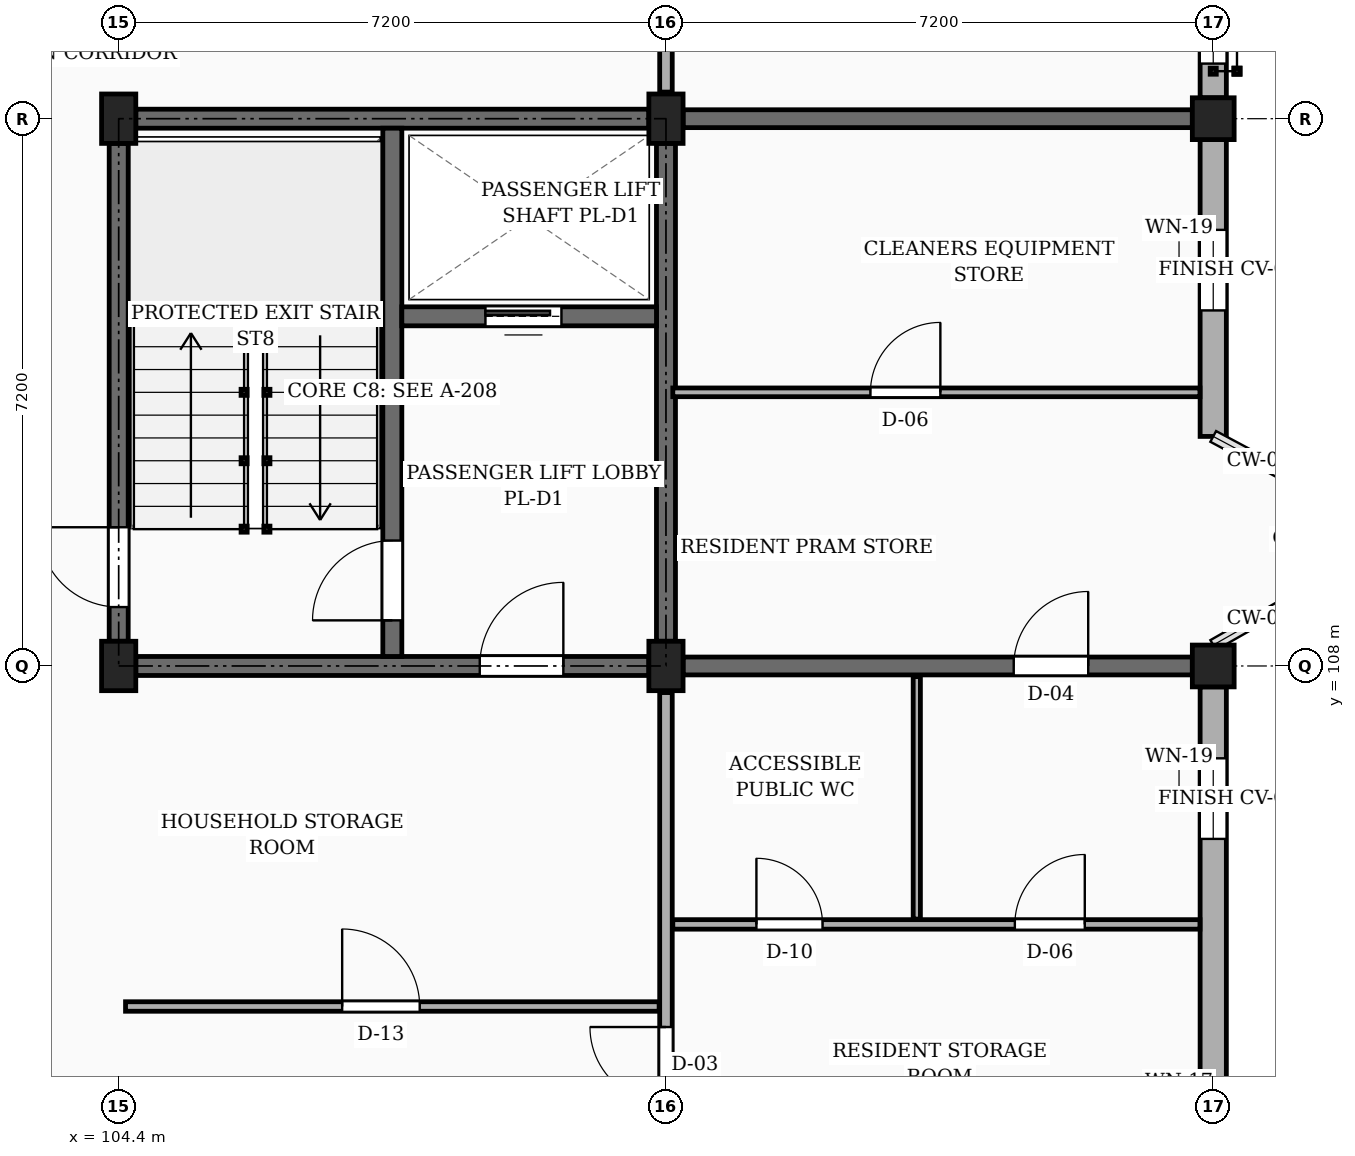
"""IFC4 building model, lengths in metres.
Left out: names, types, materials, properties, quantities, classifications, styles, units other than length and angle.
Written with IfcOpenShell. Run it as: python <this file> out.ifc"""

import sys

from ifc_helpers import new_model, si_unit, direction, frame, frame_2d, origin, origin_2d, place, context, subcontext, project, spatial, rectangle, extrude, element, fill, save


model = new_model("IFC4")
c1 = context("Model", 3, precision=1e-05, world=origin(), true_north=direction((0.0, 1.0)))
c2 = subcontext(c1, "Body", "Model", "MODEL_VIEW")
j1 = project(units=[si_unit("LENGTHUNIT", "METRE"), si_unit("PLANEANGLEUNIT", "RADIAN")], contexts=[c1])
p1 = place(None, origin())
s1 = spatial("IfcSite", under=j1, at=p1, CompositionType="ELEMENT")
p2 = place(p1, origin())
s2 = spatial("IfcBuilding", under=s1, at=p2, CompositionType="ELEMENT")
p3 = place(p2, frame((0.0, 0.0, 20.25)))
s3 = spatial("IfcBuildingStorey", under=s2, at=p3, CompositionType="ELEMENT", Elevation=20.25)
for number, where, z_axis, x_axis in (
    (1, (104.4, 108.0, 0.0), (0.0, 0.0, 1.0), (1.0, 0.0, 0.0)),
    (2, (104.4, 115.2, 0.0), (0.0, 0.0, 1.0), (1.0, 0.0, 0.0)),
    (3, (111.6, 108.0, 0.0), (0.0, 0.0, 1.0), (1.0, 0.0, 0.0)),
    (4, (111.6, 115.2, 0.0), (0.0, 0.0, 1.0), (1.0, 0.0, 0.0)),
):
    element("IfcColumn", number, at=place(p3, frame(where, z_axis=z_axis, x_axis=x_axis)), inside=s3, PredefinedType="COLUMN", context=c2, shape_type="SweptSolid", body=[
        extrude(rectangle(XDim=0.45, YDim=0.65, at=origin_2d()), origin(), (0.0, 0.0, 1.0), 3.15),
    ])
for number, where, z_axis, x_axis in (
    (5, (118.8, 108.0, 0.0), (0.0, 0.0, 1.0), (1.0, 0.0, 0.0)),
    (6, (118.8, 115.2, 0.0), (0.0, 0.0, 1.0), (1.0, 0.0, 0.0)),
):
    element("IfcColumn", number, at=place(p3, frame(where, z_axis=z_axis, x_axis=x_axis)), inside=s3, PredefinedType="COLUMN", context=c2, shape_type="SweptSolid", body=[
        extrude(rectangle(XDim=0.55, YDim=0.55, at=origin_2d()), origin(), (0.0, 0.0, 1.0), 3.15),
    ])
p4 = place(p3, frame((111.825, 108.0, 0.0), z_axis=(0.0, 0.0, 1.0), x_axis=(1.0, 0.0, 0.0)))
e7 = element("IfcWall", 7, at=p4, inside=s3, PredefinedType="SOLIDWALL", context=c2, shape_type="SweptSolid", body=[
    extrude(rectangle(XDim=6.7, YDim=0.235, at=frame_2d((3.35, 0.0))), origin(), (0.0, 0.0, 1.0), 2.19),
])
p5 = place(p4, frame((4.35, 0.0, 0.0)))
e8 = element("IfcOpeningElement", 8, at=p5, cuts=e7, PredefinedType="OPENING", context=c2, shape_type="SweptSolid", body=[
    extrude(rectangle(XDim=0.98, YDim=2.12, at=frame_2d((0.49, 1.06))), frame((0.0, 0.127, 0.0), z_axis=(0.0, -1.0, 0.0), x_axis=(1.0, 0.0, 0.0)), (0.0, 0.0, 1.0), 0.255),
])
p6 = place(p3, frame((111.825, 115.2, 0.0), z_axis=(0.0, 0.0, 1.0), x_axis=(1.0, 0.0, 0.0)))
e9 = element("IfcWall", 9, at=p6, inside=s3, PredefinedType="SOLIDWALL", context=c2, shape_type="SweptSolid", body=[
    extrude(rectangle(XDim=6.7, YDim=0.235, at=frame_2d((3.35, 0.0))), origin(), (0.0, 0.0, 1.0), 2.19),
])
p7 = place(p3, frame((118.8, 101.075, 0.0), z_axis=(0.0, 0.0, 1.0), x_axis=(0.0, 1.0, 0.0)))
e10 = element("IfcWall", 10, at=p7, inside=s3, PredefinedType="SOLIDWALL", context=c2, shape_type="SweptSolid", body=[
    extrude(rectangle(XDim=6.65, YDim=0.345, at=frame_2d((3.325, 0.0))), origin(), (0.0, 0.0, 1.0), 2.46),
])
p8 = place(p7, frame((0.45, 0.0, 0.78)))
e11 = element("IfcOpeningElement", 11, at=p8, cuts=e10, PredefinedType="OPENING", context=c2, shape_type="SweptSolid", body=[
    extrude(rectangle(XDim=0.9, YDim=1.36, at=frame_2d((0.45, 0.68))), frame((0.0, 0.183, 0.0), z_axis=(0.0, -1.0, 0.0), x_axis=(1.0, 0.0, 0.0)), (0.0, 0.0, 1.0), 0.365),
])
p9 = place(p7, frame((4.65, 0.0, 0.78)))
e12 = element("IfcOpeningElement", 12, at=p9, cuts=e10, PredefinedType="OPENING", context=c2, shape_type="SweptSolid", body=[
    extrude(rectangle(XDim=1.06, YDim=1.36, at=frame_2d((0.53, 0.68))), frame((0.0, 0.183, 0.0), z_axis=(0.0, -1.0, 0.0), x_axis=(1.0, 0.0, 0.0)), (0.0, 0.0, 1.0), 0.365),
])
p10 = place(p3, frame((118.8, 111.02, 0.0), z_axis=(0.0, 0.0, 1.0), x_axis=(0.0, 1.0, 0.0)))
e13 = element("IfcWall", 13, at=p10, inside=s3, PredefinedType="SOLIDWALL", context=c2, shape_type="SweptSolid", body=[
    extrude(rectangle(XDim=3.905, YDim=0.345, at=frame_2d((1.953, 0.0))), origin(), (0.0, 0.0, 1.0), 2.46),
])
p11 = place(p10, frame((1.657, 0.0, 0.78)))
e14 = element("IfcOpeningElement", 14, at=p11, cuts=e13, PredefinedType="OPENING", context=c2, shape_type="SweptSolid", body=[
    extrude(rectangle(XDim=1.06, YDim=1.36, at=frame_2d((0.53, 0.68))), frame((0.0, 0.183, 0.0), z_axis=(0.0, -1.0, 0.0), x_axis=(1.0, 0.0, 0.0)), (0.0, 0.0, 1.0), 0.365),
])
p12 = place(p3, frame((118.8, 115.475, 0.0), z_axis=(0.0, 0.0, 1.0), x_axis=(0.0, 1.0, 0.0)))
e15 = element("IfcWall", 15, at=p12, inside=s3, PredefinedType="SOLIDWALL", context=c2, shape_type="SweptSolid", body=[
    extrude(rectangle(XDim=6.65, YDim=0.345, at=frame_2d((3.325, 0.0))), origin(), (0.0, 0.0, 1.0), 2.46),
])
p13 = place(p12, frame((0.45, 0.0, 0.78)))
e16 = element("IfcOpeningElement", 16, at=p13, cuts=e15, PredefinedType="OPENING", context=c2, shape_type="SweptSolid", body=[
    extrude(rectangle(XDim=1.14, YDim=1.36, at=frame_2d((0.57, 0.68))), frame((0.0, 0.183, 0.0), z_axis=(0.0, -1.0, 0.0), x_axis=(1.0, 0.0, 0.0)), (0.0, 0.0, 1.0), 0.365),
])
p14 = place(p12, frame((4.65, 0.0, 0.78)))
e17 = element("IfcOpeningElement", 17, at=p14, cuts=e15, PredefinedType="OPENING", context=c2, shape_type="SweptSolid", body=[
    extrude(rectangle(XDim=1.3, YDim=1.36, at=frame_2d((0.65, 0.68))), frame((0.0, 0.183, 0.0), z_axis=(0.0, -1.0, 0.0), x_axis=(1.0, 0.0, 0.0)), (0.0, 0.0, 1.0), 0.365),
])
p15 = place(p3, frame((104.4, 108.325, 0.0), z_axis=(0.0, 0.0, 1.0), x_axis=(0.0, 1.0, 0.0)))
e18 = element("IfcWall", 18, at=p15, inside=s3, PredefinedType="SHEAR", context=c2, shape_type="SweptSolid", body=[
    extrude(rectangle(XDim=6.55, YDim=0.25, at=frame_2d((3.275, 0.0))), origin(), (0.0, 0.0, 1.0), 2.89),
])
p16 = place(p15, frame((0.45, 0.0, 0.0)))
e19 = element("IfcOpeningElement", 19, at=p16, cuts=e18, PredefinedType="OPENING", context=c2, shape_type="SweptSolid", body=[
    extrude(rectangle(XDim=1.05, YDim=2.15, at=frame_2d((0.525, 1.075))), frame((0.0, 0.135, 0.0), z_axis=(0.0, -1.0, 0.0), x_axis=(1.0, 0.0, 0.0)), (0.0, 0.0, 1.0), 0.27),
])
p17 = place(p3, frame((104.625, 115.2, 0.0), z_axis=(0.0, 0.0, 1.0), x_axis=(1.0, 0.0, 0.0)))
e20 = element("IfcWall", 20, at=p17, inside=s3, PredefinedType="SHEAR", context=c2, shape_type="SweptSolid", body=[
    extrude(rectangle(XDim=6.75, YDim=0.25, at=frame_2d((3.375, 0.0))), origin(), (0.0, 0.0, 1.0), 2.89),
])
p18 = place(p3, frame((111.6, 108.325, 0.0), z_axis=(0.0, 0.0, 1.0), x_axis=(0.0, 1.0, 0.0)))
e21 = element("IfcWall", 21, at=p18, inside=s3, PredefinedType="SHEAR", context=c2, shape_type="SweptSolid", body=[
    extrude(rectangle(XDim=6.55, YDim=0.25, at=frame_2d((3.275, 0.0))), origin(), (0.0, 0.0, 1.0), 2.89),
])
p19 = place(p3, frame((104.625, 108.0, 0.0), z_axis=(0.0, 0.0, 1.0), x_axis=(1.0, 0.0, 0.0)))
e22 = element("IfcWall", 22, at=p19, inside=s3, PredefinedType="SHEAR", context=c2, shape_type="SweptSolid", body=[
    extrude(rectangle(XDim=6.75, YDim=0.25, at=frame_2d((3.375, 0.0))), origin(), (0.0, 0.0, 1.0), 2.89),
])
p20 = place(p19, frame((4.525, 0.0, 0.0)))
e23 = element("IfcOpeningElement", 23, at=p20, cuts=e22, PredefinedType="OPENING", context=c2, shape_type="SweptSolid", body=[
    extrude(rectangle(XDim=1.1, YDim=2.15, at=frame_2d((0.55, 1.075))), frame((0.0, 0.135, 0.0), z_axis=(0.0, -1.0, 0.0), x_axis=(1.0, 0.0, 0.0)), (0.0, 0.0, 1.0), 0.27),
])
p21 = place(p3, frame((108.0, 108.125, 0.0), z_axis=(0.0, 0.0, 1.0), x_axis=(0.0, 1.0, 0.0)))
e24 = element("IfcWall", 24, at=p21, inside=s3, PredefinedType="SHEAR", context=c2, shape_type="SweptSolid", body=[
    extrude(rectangle(XDim=6.95, YDim=0.25, at=frame_2d((3.475, 0.0))), origin(), (0.0, 0.0, 1.0), 2.89),
])
p22 = place(p21, frame((0.475, 0.0, 0.0)))
e25 = element("IfcOpeningElement", 25, at=p22, cuts=e24, PredefinedType="OPENING", context=c2, shape_type="SweptSolid", body=[
    extrude(rectangle(XDim=1.05, YDim=2.15, at=frame_2d((0.525, 1.075))), frame((0.0, 0.135, 0.0), z_axis=(0.0, -1.0, 0.0), x_axis=(1.0, 0.0, 0.0)), (0.0, 0.0, 1.0), 0.27),
])
p23 = place(p3, frame((108.125, 112.6, 0.0), z_axis=(0.0, 0.0, 1.0), x_axis=(1.0, 0.0, 0.0)))
e26 = element("IfcWall", 26, at=p23, inside=s3, PredefinedType="SHEAR", context=c2, shape_type="SweptSolid", body=[
    extrude(rectangle(XDim=3.35, YDim=0.25, at=frame_2d((1.675, 0.0))), origin(), (0.0, 0.0, 1.0), 2.89),
])
p24 = place(p23, frame((1.1, 0.0, 0.0)))
e27 = element("IfcOpeningElement", 27, at=p24, cuts=e26, PredefinedType="OPENING", context=c2, shape_type="SweptSolid", body=[
    extrude(rectangle(XDim=1.0, YDim=2.2, at=frame_2d((0.5, 1.1))), frame((0.0, 0.135, 0.0), z_axis=(0.0, -1.0, 0.0), x_axis=(1.0, 0.0, 0.0)), (0.0, 0.0, 1.0), 0.27),
])
p25 = place(p3, frame((111.6, 101.15, 0.0), z_axis=(0.0, 0.0, 1.0), x_axis=(0.0, 1.0, 0.0)))
e28 = element("IfcWall", 28, at=p25, inside=s3, PredefinedType="PARTITIONING", context=c2, shape_type="SweptSolid", body=[
    extrude(rectangle(XDim=6.5, YDim=0.165, at=frame_2d((3.25, 0.0))), origin(), (0.0, 0.0, 1.0), 2.325),
])
p26 = place(p25, frame((1.1, 0.0, 0.0)))
e29 = element("IfcOpeningElement", 29, at=p26, cuts=e28, PredefinedType="OPENING", context=c2, shape_type="SweptSolid", body=[
    extrude(rectangle(XDim=1.0, YDim=2.15, at=frame_2d((0.5, 1.075))), frame((0.0, 0.093, 0.0), z_axis=(0.0, -1.0, 0.0), x_axis=(1.0, 0.0, 0.0)), (0.0, 0.0, 1.0), 0.185),
])
p27 = place(p3, frame((111.6, 115.55, 0.0), z_axis=(0.0, 0.0, 1.0), x_axis=(0.0, 1.0, 0.0)))
e30 = element("IfcWall", 30, at=p27, inside=s3, PredefinedType="PARTITIONING", context=c2, shape_type="SweptSolid", body=[
    extrude(rectangle(XDim=6.5, YDim=0.165, at=frame_2d((3.25, 0.0))), origin(), (0.0, 0.0, 1.0), 2.325),
])
p28 = place(p27, frame((1.1, 0.0, 0.0)))
e31 = element("IfcOpeningElement", 31, at=p28, cuts=e30, PredefinedType="OPENING", context=c2, shape_type="SweptSolid", body=[
    extrude(rectangle(XDim=0.94, YDim=2.12, at=frame_2d((0.47, 1.06))), frame((0.0, 0.093, 0.0), z_axis=(0.0, -1.0, 0.0), x_axis=(1.0, 0.0, 0.0)), (0.0, 0.0, 1.0), 0.185),
])
p29 = place(p3, frame((104.49, 103.52, 0.0), z_axis=(0.0, 0.0, 1.0), x_axis=(1.0, 0.0, 0.0)))
e32 = element("IfcWall", 32, at=p29, inside=s3, PredefinedType="PARTITIONING", context=c2, shape_type="SweptSolid", body=[
    extrude(rectangle(XDim=7.02, YDim=0.125, at=frame_2d((3.51, 0.0))), origin(), (0.0, 0.0, 1.0), 2.325),
])
p30 = place(p29, frame((2.85, 0.0, 0.0)))
e33 = element("IfcOpeningElement", 33, at=p30, cuts=e32, PredefinedType="OPENING", context=c2, shape_type="SweptSolid", body=[
    extrude(rectangle(XDim=1.02, YDim=2.15, at=frame_2d((0.51, 1.075))), frame((0.0, 0.073, 0.0), z_axis=(0.0, -1.0, 0.0), x_axis=(1.0, 0.0, 0.0)), (0.0, 0.0, 1.0), 0.145),
])
p31 = place(p3, frame((111.69, 104.6, 0.0), z_axis=(0.0, 0.0, 1.0), x_axis=(1.0, 0.0, 0.0)))
e34 = element("IfcWall", 34, at=p31, inside=s3, PredefinedType="PARTITIONING", context=c2, shape_type="SweptSolid", body=[
    extrude(rectangle(XDim=6.935, YDim=0.125, at=frame_2d((3.468, 0.0))), origin(), (0.0, 0.0, 1.0), 2.325),
])
p32 = place(p31, frame((1.1, 0.0, 0.0)))
e35 = element("IfcOpeningElement", 35, at=p32, cuts=e34, PredefinedType="OPENING", context=c2, shape_type="SweptSolid", body=[
    extrude(rectangle(XDim=0.87, YDim=2.05, at=frame_2d((0.435, 1.025))), frame((0.0, 0.073, 0.0), z_axis=(0.0, -1.0, 0.0), x_axis=(1.0, 0.0, 0.0)), (0.0, 0.0, 1.0), 0.145),
])
p33 = place(p31, frame((4.5, 0.0, 0.0)))
e36 = element("IfcOpeningElement", 36, at=p33, cuts=e34, PredefinedType="OPENING", context=c2, shape_type="SweptSolid", body=[
    extrude(rectangle(XDim=0.92, YDim=2.1, at=frame_2d((0.46, 1.05))), frame((0.0, 0.073, 0.0), z_axis=(0.0, -1.0, 0.0), x_axis=(1.0, 0.0, 0.0)), (0.0, 0.0, 1.0), 0.145),
])
p34 = place(p3, frame((114.9, 104.67, 0.0), z_axis=(0.0, 0.0, 1.0), x_axis=(0.0, 1.0, 0.0)))
e37 = element("IfcWall", 37, at=p34, inside=s3, PredefinedType="PARTITIONING", context=c2, shape_type="SweptSolid", body=[
    extrude(rectangle(XDim=3.19, YDim=0.095, at=frame_2d((1.595, 0.0))), origin(), (0.0, 0.0, 1.0), 2.325),
])
p35 = place(p3, frame((111.69, 111.6, 0.0), z_axis=(0.0, 0.0, 1.0), x_axis=(1.0, 0.0, 0.0)))
e38 = element("IfcWall", 38, at=p35, inside=s3, PredefinedType="PARTITIONING", context=c2, shape_type="SweptSolid", body=[
    extrude(rectangle(XDim=6.935, YDim=0.115, at=frame_2d((3.468, 0.0))), origin(), (0.0, 0.0, 1.0), 2.325),
])
p36 = place(p35, frame((2.6, 0.0, 0.0)))
e39 = element("IfcOpeningElement", 39, at=p36, cuts=e38, PredefinedType="OPENING", context=c2, shape_type="SweptSolid", body=[
    extrude(rectangle(XDim=0.92, YDim=2.1, at=frame_2d((0.46, 1.05))), frame((0.0, 0.067, 0.0), z_axis=(0.0, -1.0, 0.0), x_axis=(1.0, 0.0, 0.0)), (0.0, 0.0, 1.0), 0.135),
])
p37 = place(p9, origin())
e40 = element("IfcWindow", 40, at=p37, inside=s3, PartitioningType="SINGLE_PANEL", PredefinedType="WINDOW", context=c2, shape_type="SweptSolid", body=[
    extrude(rectangle(XDim=1.06, YDim=1.36, at=frame_2d((0.53, 0.68))), frame((0.0, 0.03, 0.0), z_axis=(0.0, -1.0, 0.0), x_axis=(1.0, 0.0, 0.0)), (0.0, 0.0, 1.0), 0.06),
])
fill(e12, e40)
p38 = place(p11, origin())
e41 = element("IfcWindow", 41, at=p38, inside=s3, PartitioningType="SINGLE_PANEL", PredefinedType="WINDOW", context=c2, shape_type="SweptSolid", body=[
    extrude(rectangle(XDim=1.06, YDim=1.36, at=frame_2d((0.53, 0.68))), frame((0.0, 0.03, 0.0), z_axis=(0.0, -1.0, 0.0), x_axis=(1.0, 0.0, 0.0)), (0.0, 0.0, 1.0), 0.06),
])
fill(e14, e41)
p39 = place(p13, origin())
e42 = element("IfcWindow", 42, at=p39, inside=s3, PartitioningType="SINGLE_PANEL", PredefinedType="WINDOW", context=c2, shape_type="SweptSolid", body=[
    extrude(rectangle(XDim=1.14, YDim=1.36, at=frame_2d((0.57, 0.68))), frame((0.0, 0.03, 0.0), z_axis=(0.0, -1.0, 0.0), x_axis=(1.0, 0.0, 0.0)), (0.0, 0.0, 1.0), 0.06),
])
fill(e16, e42)
p40 = place(p16, origin())
e43 = element("IfcDoor", 43, at=p40, inside=s3, OperationType="SINGLE_SWING_RIGHT", PredefinedType="DOOR", context=c2, shape_type="SweptSolid", body=[
    extrude(rectangle(XDim=1.05, YDim=2.15, at=frame_2d((0.525, 1.075))), frame((0.0, 0.025, 0.0), z_axis=(0.0, -1.0, 0.0), x_axis=(1.0, 0.0, 0.0)), (0.0, 0.0, 1.0), 0.05),
])
fill(e19, e43)
p41 = place(p20, frame((1.1, 0.0, 0.0), z_axis=(0.0, 0.0, 1.0), x_axis=(-1.0, 0.0, 0.0)))
e44 = element("IfcDoor", 44, at=p41, inside=s3, OperationType="SINGLE_SWING_RIGHT", PredefinedType="DOOR", context=c2, shape_type="SweptSolid", body=[
    extrude(rectangle(XDim=1.1, YDim=2.15, at=frame_2d((0.55, 1.075))), frame((0.0, 0.025, 0.0), z_axis=(0.0, -1.0, 0.0), x_axis=(1.0, 0.0, 0.0)), (0.0, 0.0, 1.0), 0.05),
])
fill(e23, e44)
p42 = place(p22, origin())
e45 = element("IfcDoor", 45, at=p42, inside=s3, OperationType="SINGLE_SWING_LEFT", PredefinedType="DOOR", context=c2, shape_type="SweptSolid", body=[
    extrude(rectangle(XDim=1.05, YDim=2.15, at=frame_2d((0.525, 1.075))), frame((0.0, 0.025, 0.0), z_axis=(0.0, -1.0, 0.0), x_axis=(1.0, 0.0, 0.0)), (0.0, 0.0, 1.0), 0.05),
])
fill(e25, e45)
p43 = place(p24, origin())
e46 = element("IfcDoor", 46, at=p43, inside=s3, OperationType="SLIDING_TO_LEFT", PredefinedType="DOOR", context=c2, shape_type="SweptSolid", body=[
    extrude(rectangle(XDim=1.0, YDim=2.2, at=frame_2d((0.5, 1.1))), frame((0.0, 0.025, 0.0), z_axis=(0.0, -1.0, 0.0), x_axis=(1.0, 0.0, 0.0)), (0.0, 0.0, 1.0), 0.05),
])
fill(e27, e46)
p44 = place(p26, origin())
e47 = element("IfcDoor", 47, at=p44, inside=s3, OperationType="SINGLE_SWING_RIGHT", PredefinedType="DOOR", context=c2, shape_type="SweptSolid", body=[
    extrude(rectangle(XDim=1.0, YDim=2.15, at=frame_2d((0.5, 1.075))), frame((0.0, 0.025, 0.0), z_axis=(0.0, -1.0, 0.0), x_axis=(1.0, 0.0, 0.0)), (0.0, 0.0, 1.0), 0.05),
])
fill(e29, e47)
p45 = place(p30, origin())
e48 = element("IfcDoor", 48, at=p45, inside=s3, OperationType="SINGLE_SWING_LEFT", PredefinedType="DOOR", context=c2, shape_type="SweptSolid", body=[
    extrude(rectangle(XDim=1.02, YDim=2.15, at=frame_2d((0.51, 1.075))), frame((0.0, 0.025, 0.0), z_axis=(0.0, -1.0, 0.0), x_axis=(1.0, 0.0, 0.0)), (0.0, 0.0, 1.0), 0.05),
])
fill(e33, e48)
p46 = place(p32, origin())
e49 = element("IfcDoor", 49, at=p46, inside=s3, OperationType="SINGLE_SWING_LEFT", PredefinedType="DOOR", context=c2, shape_type="SweptSolid", body=[
    extrude(rectangle(XDim=0.87, YDim=2.05, at=frame_2d((0.435, 1.025))), frame((0.0, 0.025, 0.0), z_axis=(0.0, -1.0, 0.0), x_axis=(1.0, 0.0, 0.0)), (0.0, 0.0, 1.0), 0.05),
])
fill(e35, e49)
p47 = place(p33, origin())
e50 = element("IfcDoor", 50, at=p47, inside=s3, OperationType="SINGLE_SWING_RIGHT", PredefinedType="DOOR", context=c2, shape_type="SweptSolid", body=[
    extrude(rectangle(XDim=0.92, YDim=2.1, at=frame_2d((0.46, 1.05))), frame((0.0, 0.025, 0.0), z_axis=(0.0, -1.0, 0.0), x_axis=(1.0, 0.0, 0.0)), (0.0, 0.0, 1.0), 0.05),
])
fill(e36, e50)
p48 = place(p36, origin())
e51 = element("IfcDoor", 51, at=p48, inside=s3, OperationType="SINGLE_SWING_RIGHT", PredefinedType="DOOR", context=c2, shape_type="SweptSolid", body=[
    extrude(rectangle(XDim=0.92, YDim=2.1, at=frame_2d((0.46, 1.05))), frame((0.0, 0.025, 0.0), z_axis=(0.0, -1.0, 0.0), x_axis=(1.0, 0.0, 0.0)), (0.0, 0.0, 1.0), 0.05),
])
fill(e39, e51)
p49 = place(p5, origin())
e52 = element("IfcDoor", 52, at=p49, inside=s3, OperationType="SINGLE_SWING_RIGHT", PredefinedType="DOOR", context=c2, shape_type="SweptSolid", body=[
    extrude(rectangle(XDim=0.98, YDim=2.12, at=frame_2d((0.49, 1.06))), frame((0.0, 0.025, 0.0), z_axis=(0.0, -1.0, 0.0), x_axis=(1.0, 0.0, 0.0)), (0.0, 0.0, 1.0), 0.05),
])
fill(e8, e52)
save(model, sys.argv[1])
